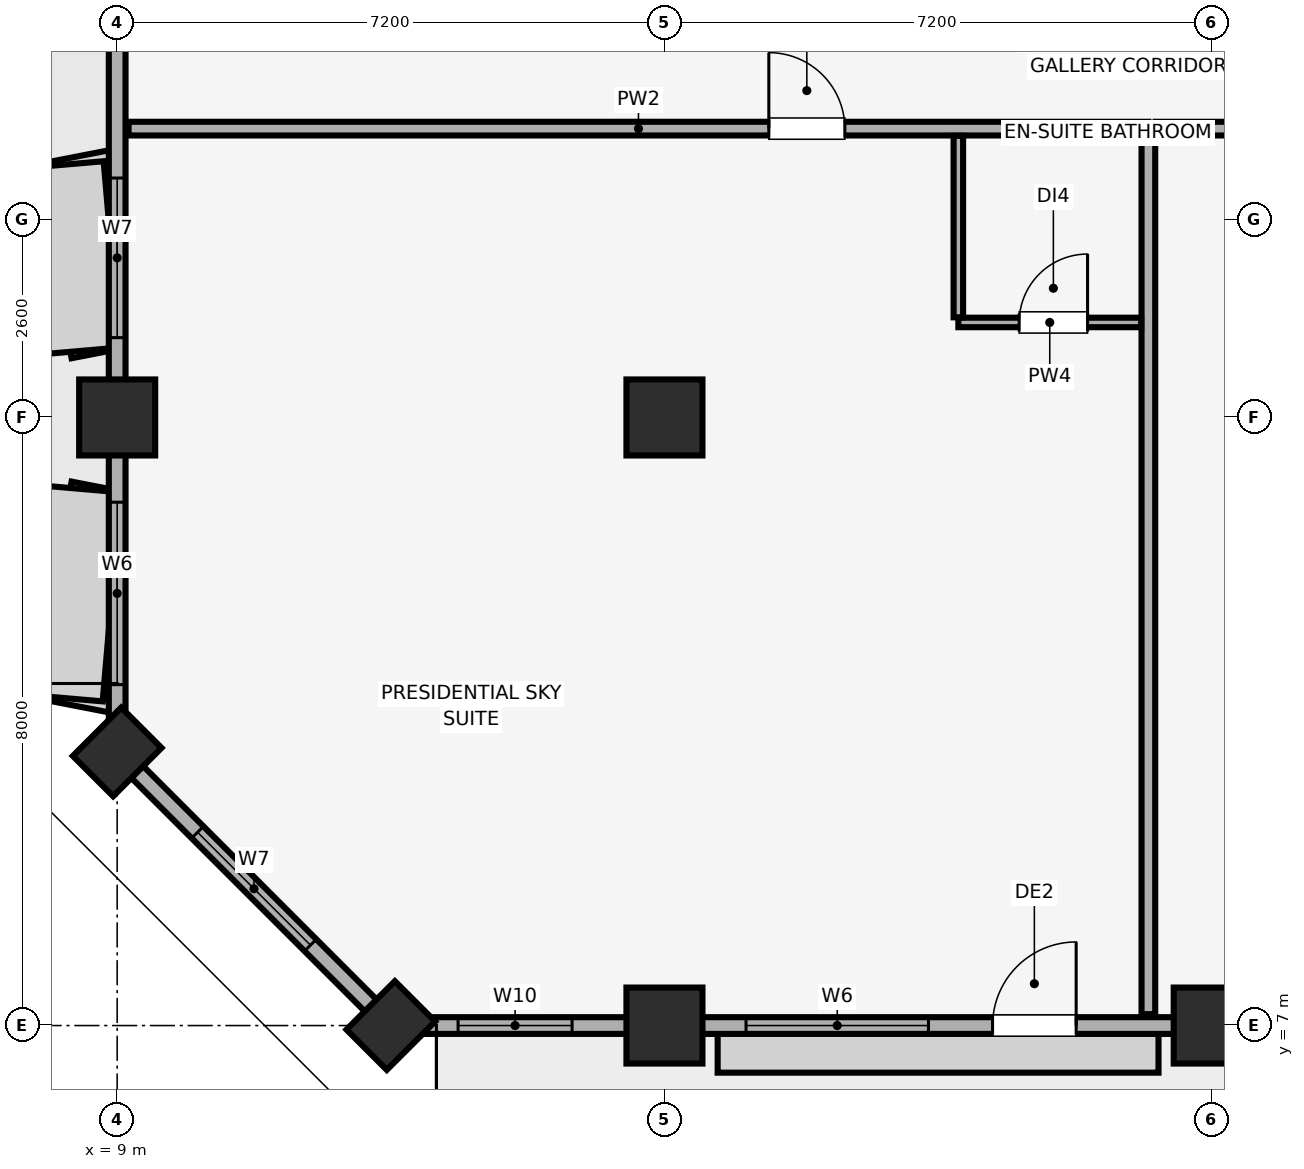
"""IFC4 building model, lengths in metres.
Left out: names, types, materials, properties, quantities, classifications, styles, units other than length and angle.
Written with IfcOpenShell. Run it as: python <this file> out.ifc"""

import sys

from ifc_helpers import new_model, si_unit, direction, frame, frame_2d, origin, origin_2d, place, context, subcontext, project, spatial, rectangle, extrude, element, fill, save


model = new_model("IFC4")
c1 = context("Model", 3, precision=1e-05, world=origin(), true_north=direction((0.0, 1.0)))
c2 = subcontext(c1, "Body", "Model", "MODEL_VIEW")
j1 = project(units=[si_unit("LENGTHUNIT", "METRE"), si_unit("PLANEANGLEUNIT", "RADIAN")], contexts=[c1])
p1 = place(None, origin())
s1 = spatial("IfcSite", under=j1, at=p1, CompositionType="ELEMENT")
p2 = place(p1, origin())
s2 = spatial("IfcBuilding", under=s1, at=p2, CompositionType="ELEMENT")
p3 = place(p2, frame((0.0, 0.0, 285.9)))
s3 = spatial("IfcBuildingStorey", under=s2, at=p3, CompositionType="ELEMENT", Elevation=285.9)
for number, where, z_axis, x_axis in (
    (1, (16.2, 7.0, 0.0), (0.0, 0.0, 1.0), (1.0, 0.0, 0.0)),
    (2, (23.4, 7.0, 0.0), (0.0, 0.0, 1.0), (1.0, 0.0, 0.0)),
    (3, (9.0, 15.0, 0.0), (0.0, 0.0, 1.0), (1.0, 0.0, 0.0)),
):
    element("IfcColumn", number, at=place(p3, frame(where, z_axis=z_axis, x_axis=x_axis)), inside=s3, PredefinedType="COLUMN", context=c2, shape_type="SweptSolid", body=[
        extrude(rectangle(XDim=1.0, YDim=1.0, at=origin_2d()), origin(), (0.0, 0.0, 1.0), 4.1),
    ])
for number, where, z_axis, x_axis in (
    (4, (12.6, 7.0, 0.0), (0.0, 0.0, 1.0), (0.707, 0.707, 0.0)),
    (5, (9.0, 10.6, 0.0), (0.0, 0.0, 1.0), (0.707, 0.707, 0.0)),
):
    element("IfcColumn", number, at=place(p3, frame(where, z_axis=z_axis, x_axis=x_axis)), inside=s3, PredefinedType="PILASTER", context=c2, shape_type="SweptSolid", body=[
        extrude(rectangle(XDim=0.9, YDim=0.75, at=origin_2d()), origin(), (0.0, 0.0, 1.0), 4.1),
    ])
p4 = place(p3, frame((16.2, 15.0, 0.0), z_axis=(0.0, 0.0, 1.0), x_axis=(1.0, 0.0, 0.0)))
e6 = element("IfcColumn", 6, at=p4, inside=s3, PredefinedType="COLUMN", context=c2, shape_type="SweptSolid", body=[
    extrude(rectangle(XDim=1.0, YDim=1.0, at=origin_2d()), origin(), (0.0, 0.0, 1.0), 4.1),
])
p5 = place(p3, frame((12.6, 7.0, 0.0), z_axis=(0.0, 0.0, 1.0), x_axis=(1.0, 0.0, 0.0)))
e7 = element("IfcWall", 7, at=p5, inside=s3, PredefinedType="SOLIDWALL", context=c2, shape_type="SweptSolid", body=[
    extrude(rectangle(XDim=58.8, YDim=0.22, at=frame_2d((29.4, 0.0))), origin(), (0.0, 0.0, 1.0), 3.3),
])
p6 = place(p5, frame((7.917, 0.0, 0.0)))
e8 = element("IfcOpeningElement", 8, at=p6, cuts=e7, PredefinedType="OPENING", context=c2, shape_type="SweptSolid", body=[
    extrude(rectangle(XDim=1.1, YDim=2.15, at=frame_2d((0.55, 1.075))), frame((0.0, 0.12, 0.0), z_axis=(0.0, -1.0, 0.0), x_axis=(1.0, 0.0, 0.0)), (0.0, 0.0, 1.0), 0.24),
])
p7 = place(p5, frame((22.583, 0.0, 0.0)))
e9 = element("IfcOpeningElement", 9, at=p7, cuts=e7, PredefinedType="OPENING", context=c2, shape_type="SweptSolid", body=[
    extrude(rectangle(XDim=1.1, YDim=2.15, at=frame_2d((0.55, 1.075))), frame((0.0, 0.12, 0.0), z_axis=(0.0, -1.0, 0.0), x_axis=(1.0, 0.0, 0.0)), (0.0, 0.0, 1.0), 0.24),
])
p8 = place(p5, frame((49.783, 0.0, 0.0)))
e10 = element("IfcOpeningElement", 10, at=p8, cuts=e7, PredefinedType="OPENING", context=c2, shape_type="SweptSolid", body=[
    extrude(rectangle(XDim=1.1, YDim=2.15, at=frame_2d((0.55, 1.075))), frame((0.0, 0.12, 0.0), z_axis=(0.0, -1.0, 0.0), x_axis=(1.0, 0.0, 0.0)), (0.0, 0.0, 1.0), 0.24),
])
p9 = place(p5, frame((0.885, 0.0, 0.85)))
e11 = element("IfcOpeningElement", 11, at=p9, cuts=e7, PredefinedType="OPENING", context=c2, shape_type="SweptSolid", body=[
    extrude(rectangle(XDim=1.5, YDim=1.4, at=frame_2d((0.75, 0.7))), frame((0.0, 0.12, 0.0), z_axis=(0.0, -1.0, 0.0), x_axis=(1.0, 0.0, 0.0)), (0.0, 0.0, 1.0), 0.24),
])
p10 = place(p5, frame((4.673, 0.0, 0.85)))
e12 = element("IfcOpeningElement", 12, at=p10, cuts=e7, PredefinedType="OPENING", context=c2, shape_type="SweptSolid", body=[
    extrude(rectangle(XDim=2.4, YDim=1.5, at=frame_2d((1.2, 0.75))), frame((0.0, 0.12, 0.0), z_axis=(0.0, -1.0, 0.0), x_axis=(1.0, 0.0, 0.0)), (0.0, 0.0, 1.0), 0.24),
])
p11 = place(p5, frame((12.8, 0.0, 0.85)))
e13 = element("IfcOpeningElement", 13, at=p11, cuts=e7, PredefinedType="OPENING", context=c2, shape_type="SweptSolid", body=[
    extrude(rectangle(XDim=3.2, YDim=1.85, at=frame_2d((1.6, 0.925))), frame((0.0, 0.12, 0.0), z_axis=(0.0, -1.0, 0.0), x_axis=(1.0, 0.0, 0.0)), (0.0, 0.0, 1.0), 0.24),
])
p12 = place(p5, frame((20.298, 0.0, 0.85)))
e14 = element("IfcOpeningElement", 14, at=p12, cuts=e7, PredefinedType="OPENING", context=c2, shape_type="SweptSolid", body=[
    extrude(rectangle(XDim=1.5, YDim=1.4, at=frame_2d((0.75, 0.7))), frame((0.0, 0.12, 0.0), z_axis=(0.0, -1.0, 0.0), x_axis=(1.0, 0.0, 0.0)), (0.0, 0.0, 1.0), 0.24),
])
p13 = place(p5, frame((26.3, 0.0, 0.85)))
e15 = element("IfcOpeningElement", 15, at=p13, cuts=e7, PredefinedType="OPENING", context=c2, shape_type="SweptSolid", body=[
    extrude(rectangle(XDim=2.4, YDim=1.5, at=frame_2d((1.2, 0.75))), frame((0.0, 0.12, 0.0), z_axis=(0.0, -1.0, 0.0), x_axis=(1.0, 0.0, 0.0)), (0.0, 0.0, 1.0), 0.24),
])
p14 = place(p5, frame((30.1, 0.0, 0.85)))
e16 = element("IfcOpeningElement", 16, at=p14, cuts=e7, PredefinedType="OPENING", context=c2, shape_type="SweptSolid", body=[
    extrude(rectangle(XDim=2.4, YDim=1.5, at=frame_2d((1.2, 0.75))), frame((0.0, 0.12, 0.0), z_axis=(0.0, -1.0, 0.0), x_axis=(1.0, 0.0, 0.0)), (0.0, 0.0, 1.0), 0.24),
])
p15 = place(p5, frame((34.958, 0.0, 0.85)))
e17 = element("IfcOpeningElement", 17, at=p15, cuts=e7, PredefinedType="OPENING", context=c2, shape_type="SweptSolid", body=[
    extrude(rectangle(XDim=3.2, YDim=1.85, at=frame_2d((1.6, 0.925))), frame((0.0, 0.12, 0.0), z_axis=(0.0, -1.0, 0.0), x_axis=(1.0, 0.0, 0.0)), (0.0, 0.0, 1.0), 0.24),
])
p16 = place(p5, frame((42.8, 0.0, 0.85)))
e18 = element("IfcOpeningElement", 18, at=p16, cuts=e7, PredefinedType="OPENING", context=c2, shape_type="SweptSolid", body=[
    extrude(rectangle(XDim=3.2, YDim=1.85, at=frame_2d((1.6, 0.925))), frame((0.0, 0.12, 0.0), z_axis=(0.0, -1.0, 0.0), x_axis=(1.0, 0.0, 0.0)), (0.0, 0.0, 1.0), 0.24),
])
p17 = place(p5, frame((51.727, 0.0, 0.85)))
e19 = element("IfcOpeningElement", 19, at=p17, cuts=e7, PredefinedType="OPENING", context=c2, shape_type="SweptSolid", body=[
    extrude(rectangle(XDim=2.4, YDim=1.5, at=frame_2d((1.2, 0.75))), frame((0.0, 0.12, 0.0), z_axis=(0.0, -1.0, 0.0), x_axis=(1.0, 0.0, 0.0)), (0.0, 0.0, 1.0), 0.24),
])
p18 = place(p5, frame((56.415, 0.0, 0.85)))
e20 = element("IfcOpeningElement", 20, at=p18, cuts=e7, PredefinedType="OPENING", context=c2, shape_type="SweptSolid", body=[
    extrude(rectangle(XDim=1.5, YDim=1.4, at=frame_2d((0.75, 0.7))), frame((0.0, 0.12, 0.0), z_axis=(0.0, -1.0, 0.0), x_axis=(1.0, 0.0, 0.0)), (0.0, 0.0, 1.0), 0.24),
])
p19 = place(p3, frame((9.0, 45.4, 0.0), z_axis=(0.0, 0.0, 1.0), x_axis=(0.0, -1.0, 0.0)))
e21 = element("IfcWall", 21, at=p19, inside=s3, PredefinedType="SOLIDWALL", context=c2, shape_type="SweptSolid", body=[
    extrude(rectangle(XDim=34.8, YDim=0.22, at=frame_2d((17.4, 0.0))), origin(), (0.0, 0.0, 1.0), 3.3),
])
p20 = place(p19, frame((22.5, 0.0, 0.0)))
e22 = element("IfcOpeningElement", 22, at=p20, cuts=e21, PredefinedType="OPENING", context=c2, shape_type="SweptSolid", body=[
    extrude(rectangle(XDim=1.4, YDim=2.2, at=frame_2d((0.7, 1.1))), frame((0.0, 0.12, 0.0), z_axis=(0.0, -1.0, 0.0), x_axis=(1.0, 0.0, 0.0)), (0.0, 0.0, 1.0), 0.24),
])
p21 = place(p19, frame((31.515, 0.0, 0.85)))
e23 = element("IfcOpeningElement", 23, at=p21, cuts=e21, PredefinedType="OPENING", context=c2, shape_type="SweptSolid", body=[
    extrude(rectangle(XDim=2.4, YDim=1.5, at=frame_2d((1.2, 0.75))), frame((0.0, 0.12, 0.0), z_axis=(0.0, -1.0, 0.0), x_axis=(1.0, 0.0, 0.0)), (0.0, 0.0, 1.0), 0.24),
])
p22 = place(p19, frame((27.25, 0.0, 0.85)))
e24 = element("IfcOpeningElement", 24, at=p22, cuts=e21, PredefinedType="OPENING", context=c2, shape_type="SweptSolid", body=[
    extrude(rectangle(XDim=2.1, YDim=1.6, at=frame_2d((1.05, 0.8))), frame((0.0, 0.12, 0.0), z_axis=(0.0, -1.0, 0.0), x_axis=(1.0, 0.0, 0.0)), (0.0, 0.0, 1.0), 0.24),
])
p23 = place(p19, frame((17.54, 0.0, 0.85)))
e25 = element("IfcOpeningElement", 25, at=p23, cuts=e21, PredefinedType="OPENING", context=c2, shape_type="SweptSolid", body=[
    extrude(rectangle(XDim=3.6, YDim=1.65, at=frame_2d((1.8, 0.825))), frame((0.0, 0.12, 0.0), z_axis=(0.0, -1.0, 0.0), x_axis=(1.0, 0.0, 0.0)), (0.0, 0.0, 1.0), 0.24),
])
p24 = place(p19, frame((11.785, 0.0, 0.85)))
e26 = element("IfcOpeningElement", 26, at=p24, cuts=e21, PredefinedType="OPENING", context=c2, shape_type="SweptSolid", body=[
    extrude(rectangle(XDim=3.0, YDim=1.5, at=frame_2d((1.5, 0.75))), frame((0.0, 0.12, 0.0), z_axis=(0.0, -1.0, 0.0), x_axis=(1.0, 0.0, 0.0)), (0.0, 0.0, 1.0), 0.24),
])
p25 = place(p19, frame((7.015, 0.0, 0.85)))
e27 = element("IfcOpeningElement", 27, at=p25, cuts=e21, PredefinedType="OPENING", context=c2, shape_type="SweptSolid", body=[
    extrude(rectangle(XDim=3.0, YDim=1.5, at=frame_2d((1.5, 0.75))), frame((0.0, 0.12, 0.0), z_axis=(0.0, -1.0, 0.0), x_axis=(1.0, 0.0, 0.0)), (0.0, 0.0, 1.0), 0.24),
])
p26 = place(p19, frame((0.985, 0.0, 0.85)))
e28 = element("IfcOpeningElement", 28, at=p26, cuts=e21, PredefinedType="OPENING", context=c2, shape_type="SweptSolid", body=[
    extrude(rectangle(XDim=3.6, YDim=1.65, at=frame_2d((1.8, 0.825))), frame((0.0, 0.12, 0.0), z_axis=(0.0, -1.0, 0.0), x_axis=(1.0, 0.0, 0.0)), (0.0, 0.0, 1.0), 0.24),
])
p27 = place(p3, frame((9.0, 10.6, 0.0), z_axis=(0.0, 0.0, 1.0), x_axis=(0.707106781187, -0.707106781187, 0.0)))
e29 = element("IfcWall", 29, at=p27, inside=s3, PredefinedType="SOLIDWALL", context=c2, shape_type="SweptSolid", body=[
    extrude(rectangle(XDim=5.091, YDim=0.22, at=frame_2d((2.546, 0.0))), origin(), (0.0, 0.0, 1.0), 3.3),
])
p28 = place(p27, frame((1.496, 0.0, 0.85)))
e30 = element("IfcOpeningElement", 30, at=p28, cuts=e29, PredefinedType="OPENING", context=c2, shape_type="SweptSolid", body=[
    extrude(rectangle(XDim=2.1, YDim=1.6, at=frame_2d((1.05, 0.8))), frame((0.0, 0.12, 0.0), z_axis=(0.0, -1.0, 0.0), x_axis=(1.0, 0.0, 0.0)), (0.0, 0.0, 1.0), 0.24),
])
p29 = place(p3, frame((9.15, 18.8, 0.0), z_axis=(0.0, 0.0, 1.0), x_axis=(1.0, 0.0, 0.0)))
e31 = element("IfcWall", 31, at=p29, inside=s3, PredefinedType="PARTITIONING", context=c2, shape_type="SweptSolid", body=[
    extrude(rectangle(XDim=13.417, YDim=0.18, at=frame_2d((6.708, 0.0))), origin(), (0.0, 0.0, 1.0), 4.1),
])
p30 = place(p29, frame((8.423, 0.0, 0.0)))
e32 = element("IfcOpeningElement", 32, at=p30, cuts=e31, PredefinedType="OPENING", context=c2, shape_type="SweptSolid", body=[
    extrude(rectangle(XDim=1.0, YDim=2.15, at=frame_2d((0.5, 1.075))), frame((0.0, 0.1, 0.0), z_axis=(0.0, -1.0, 0.0), x_axis=(1.0, 0.0, 0.0)), (0.0, 0.0, 1.0), 0.2),
])
p31 = place(p3, frame((22.567, 7.15, 0.0), z_axis=(0.0, 0.0, 1.0), x_axis=(0.0, 1.0, 0.0)))
e33 = element("IfcWall", 33, at=p31, inside=s3, PredefinedType="PARTITIONING", context=c2, shape_type="SweptSolid", body=[
    extrude(rectangle(XDim=11.555, YDim=0.18, at=frame_2d((5.778, 0.0))), origin(), (0.0, 0.0, 1.0), 4.1),
])
p32 = place(p3, frame((20.067, 16.25, 0.0), z_axis=(0.0, 0.0, 1.0), x_axis=(1.0, 0.0, 0.0)))
e34 = element("IfcWall", 34, at=p32, inside=s3, PredefinedType="PARTITIONING", context=c2, shape_type="SweptSolid", body=[
    extrude(rectangle(XDim=2.405, YDim=0.125, at=frame_2d((1.203, 0.0))), origin(), (0.0, 0.0, 1.0), 4.1),
])
p33 = place(p32, frame((0.8, 0.0, 0.0)))
e35 = element("IfcOpeningElement", 35, at=p33, cuts=e34, PredefinedType="OPENING", context=c2, shape_type="SweptSolid", body=[
    extrude(rectangle(XDim=0.9, YDim=2.1, at=frame_2d((0.45, 1.05))), frame((0.0, 0.073, 0.0), z_axis=(0.0, -1.0, 0.0), x_axis=(1.0, 0.0, 0.0)), (0.0, 0.0, 1.0), 0.145),
])
p34 = place(p3, frame((20.067, 16.317, 0.0), z_axis=(0.0, 0.0, 1.0), x_axis=(0.0, 1.0, 0.0)))
e36 = element("IfcWall", 36, at=p34, inside=s3, PredefinedType="PARTITIONING", context=c2, shape_type="SweptSolid", body=[
    extrude(rectangle(XDim=2.388, YDim=0.125, at=frame_2d((1.194, 0.0))), origin(), (0.0, 0.0, 1.0), 4.1),
])
p35 = place(p3, frame((22.662, 18.8, 0.0), z_axis=(0.0, 0.0, 1.0), x_axis=(1.0, 0.0, 0.0)))
e37 = element("IfcWall", 37, at=p35, inside=s3, PredefinedType="PARTITIONING", context=c2, shape_type="SweptSolid", body=[
    extrude(rectangle(XDim=9.622, YDim=0.18, at=frame_2d((4.811, 0.0))), origin(), (0.0, 0.0, 1.0), 4.1),
])
p36 = place(p35, frame((3.37, 0.0, 0.0)))
e38 = element("IfcOpeningElement", 38, at=p36, cuts=e37, PredefinedType="OPENING", context=c2, shape_type="SweptSolid", body=[
    extrude(rectangle(XDim=1.0, YDim=2.15, at=frame_2d((0.5, 1.075))), frame((0.0, 0.1, 0.0), z_axis=(0.0, -1.0, 0.0), x_axis=(1.0, 0.0, 0.0)), (0.0, 0.0, 1.0), 0.2),
])
p37 = place(p28, origin())
e39 = element("IfcWindow", 39, at=p37, inside=s3, PartitioningType="SINGLE_PANEL", PredefinedType="WINDOW", context=c2, shape_type="SweptSolid", body=[
    extrude(rectangle(XDim=2.1, YDim=1.6, at=frame_2d((1.05, 0.8))), frame((0.0, 0.03, 0.0), z_axis=(0.0, -1.0, 0.0), x_axis=(1.0, 0.0, 0.0)), (0.0, 0.0, 1.0), 0.06),
])
fill(e30, e39)
p38 = place(p6, origin())
e40 = element("IfcDoor", 40, at=p38, inside=s3, OperationType="SINGLE_SWING_RIGHT", PredefinedType="DOOR", context=c2, shape_type="SweptSolid", body=[
    extrude(rectangle(XDim=1.1, YDim=2.15, at=frame_2d((0.55, 1.075))), frame((0.0, 0.025, 0.0), z_axis=(0.0, -1.0, 0.0), x_axis=(1.0, 0.0, 0.0)), (0.0, 0.0, 1.0), 0.05),
])
fill(e8, e40)
p39 = place(p9, origin())
e41 = element("IfcWindow", 41, at=p39, inside=s3, PartitioningType="SINGLE_PANEL", PredefinedType="WINDOW", context=c2, shape_type="SweptSolid", body=[
    extrude(rectangle(XDim=1.5, YDim=1.4, at=frame_2d((0.75, 0.7))), frame((0.0, 0.03, 0.0), z_axis=(0.0, -1.0, 0.0), x_axis=(1.0, 0.0, 0.0)), (0.0, 0.0, 1.0), 0.06),
])
fill(e11, e41)
p40 = place(p10, origin())
e42 = element("IfcWindow", 42, at=p40, inside=s3, PartitioningType="SINGLE_PANEL", PredefinedType="WINDOW", context=c2, shape_type="SweptSolid", body=[
    extrude(rectangle(XDim=2.4, YDim=1.5, at=frame_2d((1.2, 0.75))), frame((0.0, 0.03, 0.0), z_axis=(0.0, -1.0, 0.0), x_axis=(1.0, 0.0, 0.0)), (0.0, 0.0, 1.0), 0.06),
])
fill(e12, e42)
p41 = place(p21, origin())
e43 = element("IfcWindow", 43, at=p41, inside=s3, PartitioningType="SINGLE_PANEL", PredefinedType="WINDOW", context=c2, shape_type="SweptSolid", body=[
    extrude(rectangle(XDim=2.4, YDim=1.5, at=frame_2d((1.2, 0.75))), frame((0.0, 0.03, 0.0), z_axis=(0.0, -1.0, 0.0), x_axis=(1.0, 0.0, 0.0)), (0.0, 0.0, 1.0), 0.06),
])
fill(e23, e43)
p42 = place(p22, origin())
e44 = element("IfcWindow", 44, at=p42, inside=s3, PartitioningType="SINGLE_PANEL", PredefinedType="WINDOW", context=c2, shape_type="SweptSolid", body=[
    extrude(rectangle(XDim=2.1, YDim=1.6, at=frame_2d((1.05, 0.8))), frame((0.0, 0.03, 0.0), z_axis=(0.0, -1.0, 0.0), x_axis=(1.0, 0.0, 0.0)), (0.0, 0.0, 1.0), 0.06),
])
fill(e24, e44)
p43 = place(p30, origin())
e45 = element("IfcDoor", 45, at=p43, inside=s3, OperationType="SINGLE_SWING_LEFT", PredefinedType="DOOR", context=c2, shape_type="SweptSolid", body=[
    extrude(rectangle(XDim=1.0, YDim=2.15, at=frame_2d((0.5, 1.075))), frame((0.0, 0.025, 0.0), z_axis=(0.0, -1.0, 0.0), x_axis=(1.0, 0.0, 0.0)), (0.0, 0.0, 1.0), 0.05),
])
fill(e32, e45)
p44 = place(p33, origin())
e46 = element("IfcDoor", 46, at=p44, inside=s3, OperationType="SINGLE_SWING_RIGHT", PredefinedType="DOOR", context=c2, shape_type="SweptSolid", body=[
    extrude(rectangle(XDim=0.9, YDim=2.1, at=frame_2d((0.45, 1.05))), frame((0.0, 0.025, 0.0), z_axis=(0.0, -1.0, 0.0), x_axis=(1.0, 0.0, 0.0)), (0.0, 0.0, 1.0), 0.05),
])
fill(e35, e46)
save(model, sys.argv[1])
